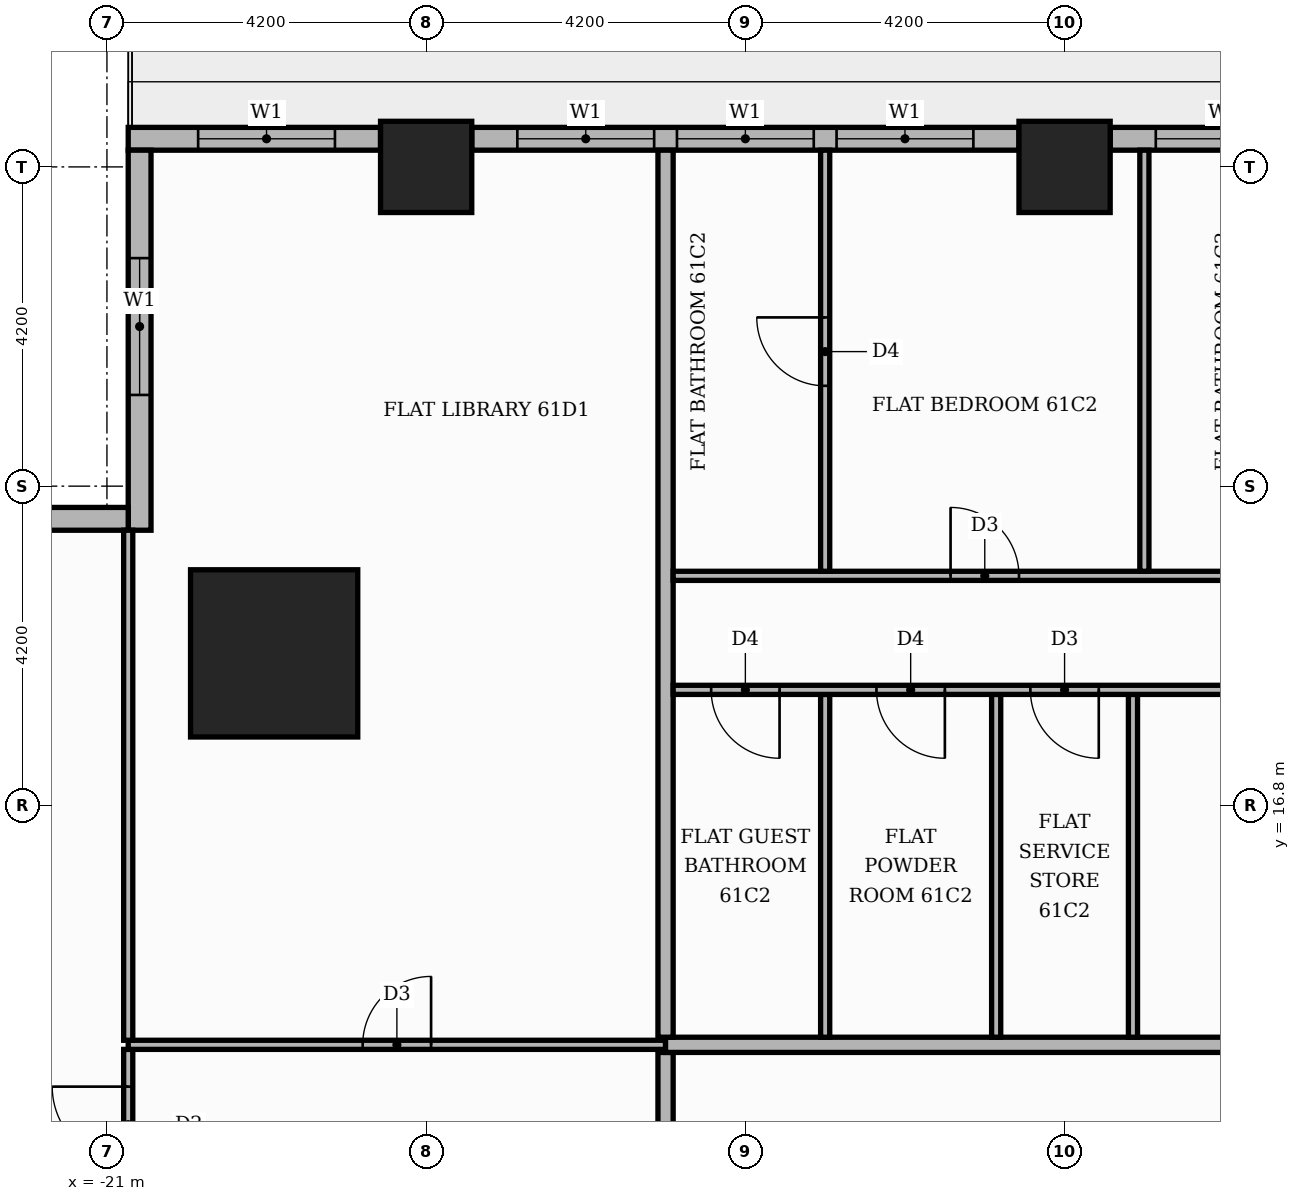
"""IFC4 building model, lengths in metres.
Left out: names, types, materials, properties, quantities, classifications, styles, units other than length and angle.
Written with IfcOpenShell. Run it as: python <this file> out.ifc"""

import sys

from ifc_helpers import new_model, si_unit, direction, frame, frame_2d, origin, origin_2d, place, context, subcontext, project, spatial, rectangle, extrude, element, fill, save


model = new_model("IFC4")
c1 = context("Model", 3, precision=1e-05, world=origin(), true_north=direction((0.0, 1.0)))
c2 = subcontext(c1, "Body", "Model", "MODEL_VIEW")
j1 = project(units=[si_unit("LENGTHUNIT", "METRE"), si_unit("PLANEANGLEUNIT", "RADIAN")], contexts=[c1])
p1 = place(None, origin())
s1 = spatial("IfcSite", under=j1, at=p1, CompositionType="ELEMENT")
p2 = place(p1, origin())
s2 = spatial("IfcBuilding", under=s1, at=p2, CompositionType="ELEMENT")
p3 = place(p2, frame((0.0, 0.0, 256.2)))
s3 = spatial("IfcBuildingStorey", under=s2, at=p3, CompositionType="ELEMENT", Elevation=256.2)
p4 = place(p3, frame((-18.8, 18.8, 0.0), z_axis=(0.0, 0.0, 1.0), x_axis=(1.0, 0.0, 0.0)))
e1 = element("IfcColumn", 1, at=p4, inside=s3, PredefinedType="COLUMN", context=c2, shape_type="SweptSolid", body=[
    extrude(rectangle(XDim=2.2, YDim=2.2, at=origin_2d()), origin(), (0.0, 0.0, 1.0), 3.9),
])
for number, where, z_axis, x_axis in (
    (2, (-8.4, 25.2, 0.0), (0.0, 0.0, 1.0), (1.0, 0.0, 0.0)),
    (3, (-16.8, 25.2, 0.0), (0.0, 0.0, 1.0), (1.0, 0.0, 0.0)),
):
    element("IfcColumn", number, at=place(p3, frame(where, z_axis=z_axis, x_axis=x_axis)), inside=s3, PredefinedType="COLUMN", context=c2, shape_type="SweptSolid", body=[
        extrude(rectangle(XDim=1.2, YDim=1.2, at=origin_2d()), origin(), (0.0, 0.0, 1.0), 3.9),
    ])
p5 = place(p3, frame((-0.6, 25.57, 0.0), z_axis=(0.0, 0.0, 1.0), x_axis=(-1.0, 0.0, 0.0)))
e4 = element("IfcWall", 4, at=p5, inside=s3, PredefinedType="STANDARD", context=c2, shape_type="SweptSolid", body=[
    extrude(rectangle(XDim=7.2, YDim=0.3, at=frame_2d((3.6, 0.0))), origin(), (0.0, 0.0, 1.0), 3.48),
])
p6 = place(p5, frame((0.6, 0.0, 0.0)))
e5 = element("IfcOpeningElement", 5, at=p6, cuts=e4, PredefinedType="OPENING", context=c2, shape_type="SweptSolid", body=[
    extrude(rectangle(XDim=1.8, YDim=2.4, at=frame_2d((0.9, 1.2))), frame((0.0, 0.16, 0.0), z_axis=(0.0, -1.0, 0.0), x_axis=(1.0, 0.0, 0.0)), (0.0, 0.0, 1.0), 0.32),
])
p7 = place(p5, frame((2.7, 0.0, 0.9)))
e6 = element("IfcOpeningElement", 6, at=p7, cuts=e4, PredefinedType="OPENING", context=c2, shape_type="SweptSolid", body=[
    extrude(rectangle(XDim=1.8, YDim=2.1, at=frame_2d((0.9, 1.05))), frame((0.0, 0.16, 0.0), z_axis=(0.0, -1.0, 0.0), x_axis=(1.0, 0.0, 0.0)), (0.0, 0.0, 1.0), 0.32),
])
p8 = place(p5, frame((4.8, 0.0, 0.9)))
e7 = element("IfcOpeningElement", 7, at=p8, cuts=e4, PredefinedType="OPENING", context=c2, shape_type="SweptSolid", body=[
    extrude(rectangle(XDim=1.8, YDim=2.1, at=frame_2d((0.9, 1.05))), frame((0.0, 0.16, 0.0), z_axis=(0.0, -1.0, 0.0), x_axis=(1.0, 0.0, 0.0)), (0.0, 0.0, 1.0), 0.32),
])
p9 = place(p3, frame((-9.0, 25.57, 0.0), z_axis=(0.0, 0.0, 1.0), x_axis=(-1.0, 0.0, 0.0)))
e8 = element("IfcWall", 8, at=p9, inside=s3, PredefinedType="STANDARD", context=c2, shape_type="SweptSolid", body=[
    extrude(rectangle(XDim=7.2, YDim=0.3, at=frame_2d((3.6, 0.0))), origin(), (0.0, 0.0, 1.0), 3.48),
])
p10 = place(p9, frame((0.6, 0.0, 0.9)))
e9 = element("IfcOpeningElement", 9, at=p10, cuts=e8, PredefinedType="OPENING", context=c2, shape_type="SweptSolid", body=[
    extrude(rectangle(XDim=1.8, YDim=2.1, at=frame_2d((0.9, 1.05))), frame((0.0, 0.16, 0.0), z_axis=(0.0, -1.0, 0.0), x_axis=(1.0, 0.0, 0.0)), (0.0, 0.0, 1.0), 0.32),
])
p11 = place(p9, frame((2.7, 0.0, 0.9)))
e10 = element("IfcOpeningElement", 10, at=p11, cuts=e8, PredefinedType="OPENING", context=c2, shape_type="SweptSolid", body=[
    extrude(rectangle(XDim=1.8, YDim=2.1, at=frame_2d((0.9, 1.05))), frame((0.0, 0.16, 0.0), z_axis=(0.0, -1.0, 0.0), x_axis=(1.0, 0.0, 0.0)), (0.0, 0.0, 1.0), 0.32),
])
p12 = place(p9, frame((4.8, 0.0, 0.9)))
e11 = element("IfcOpeningElement", 11, at=p12, cuts=e8, PredefinedType="OPENING", context=c2, shape_type="SweptSolid", body=[
    extrude(rectangle(XDim=1.8, YDim=2.1, at=frame_2d((0.9, 1.05))), frame((0.0, 0.16, 0.0), z_axis=(0.0, -1.0, 0.0), x_axis=(1.0, 0.0, 0.0)), (0.0, 0.0, 1.0), 0.32),
])
p13 = place(p3, frame((-17.4, 25.57, 0.0), z_axis=(0.0, 0.0, 1.0), x_axis=(-1.0, 0.0, 0.0)))
e12 = element("IfcWall", 12, at=p13, inside=s3, PredefinedType="STANDARD", context=c2, shape_type="SweptSolid", body=[
    extrude(rectangle(XDim=3.32, YDim=0.3, at=frame_2d((1.66, 0.0))), origin(), (0.0, 0.0, 1.0), 3.48),
])
p14 = place(p13, frame((0.6, 0.0, 0.9)))
e13 = element("IfcOpeningElement", 13, at=p14, cuts=e12, PredefinedType="OPENING", context=c2, shape_type="SweptSolid", body=[
    extrude(rectangle(XDim=1.8, YDim=2.1, at=frame_2d((0.9, 1.05))), frame((0.0, 0.16, 0.0), z_axis=(0.0, -1.0, 0.0), x_axis=(1.0, 0.0, 0.0)), (0.0, 0.0, 1.0), 0.32),
])
p15 = place(p3, frame((-20.57, 25.42, 0.0), z_axis=(0.0, 0.0, 1.0), x_axis=(0.0, -1.0, 0.0)))
e14 = element("IfcWall", 14, at=p15, inside=s3, PredefinedType="STANDARD", context=c2, shape_type="SweptSolid", body=[
    extrude(rectangle(XDim=5.0, YDim=0.3, at=frame_2d((2.5, 0.0))), origin(), (0.0, 0.0, 1.0), 3.48),
])
p16 = place(p15, frame((1.42, 0.0, 0.9)))
e15 = element("IfcOpeningElement", 15, at=p16, cuts=e14, PredefinedType="OPENING", context=c2, shape_type="SweptSolid", body=[
    extrude(rectangle(XDim=1.8, YDim=2.1, at=frame_2d((0.9, 1.05))), frame((0.0, 0.16, 0.0), z_axis=(0.0, -1.0, 0.0), x_axis=(1.0, 0.0, 0.0)), (0.0, 0.0, 1.0), 0.32),
])
p17 = place(p3, frame((-20.72, 20.57, 0.0), z_axis=(0.0, 0.0, 1.0), x_axis=(-1.0, 0.0, 0.0)))
e16 = element("IfcWall", 16, at=p17, inside=s3, PredefinedType="STANDARD", context=c2, shape_type="SweptSolid", body=[
    extrude(rectangle(XDim=5.0, YDim=0.3, at=frame_2d((2.5, 0.0))), origin(), (0.0, 0.0, 1.0), 3.48),
])
p18 = place(p17, frame((1.48, 0.0, 0.9)))
e17 = element("IfcOpeningElement", 17, at=p18, cuts=e16, PredefinedType="OPENING", context=c2, shape_type="SweptSolid", body=[
    extrude(rectangle(XDim=1.8, YDim=2.1, at=frame_2d((0.9, 1.05))), frame((0.0, 0.16, 0.0), z_axis=(0.0, -1.0, 0.0), x_axis=(1.0, 0.0, 0.0)), (0.0, 0.0, 1.0), 0.32),
])
p19 = place(p3, frame((-13.65, 11.1, 0.0), z_axis=(0.0, 0.0, 1.0), x_axis=(0.0, 1.0, 0.0)))
e18 = element("IfcWall", 18, at=p19, inside=s3, PredefinedType="PARTITIONING", context=c2, shape_type="SweptSolid", body=[
    extrude(rectangle(XDim=2.45, YDim=0.2, at=frame_2d((1.225, 0.0))), origin(), (0.0, 0.0, 1.0), 3.48),
])
p20 = place(p3, frame((-20.72, 11.61, 0.0), z_axis=(0.0, 0.0, 1.0), x_axis=(0.0, 1.0, 0.0)))
e19 = element("IfcWall", 19, at=p20, inside=s3, PredefinedType="PARTITIONING", context=c2, shape_type="SweptSolid", body=[
    extrude(rectangle(XDim=1.98, YDim=0.12, at=frame_2d((0.99, 0.0))), origin(), (0.0, 0.0, 1.0), 3.48),
])
p21 = place(p20, frame((0.49, 0.0, 0.0)))
e20 = element("IfcOpeningElement", 20, at=p21, cuts=e19, PredefinedType="OPENING", context=c2, shape_type="SweptSolid", body=[
    extrude(rectangle(XDim=1.0, YDim=2.1, at=frame_2d((0.5, 1.05))), frame((0.0, 0.07, 0.0), z_axis=(0.0, -1.0, 0.0), x_axis=(1.0, 0.0, 0.0)), (0.0, 0.0, 1.0), 0.14),
])
p22 = place(p3, frame((-20.72, 13.65, 0.0), z_axis=(0.0, 0.0, 1.0), x_axis=(1.0, 0.0, 0.0)))
e21 = element("IfcWall", 21, at=p22, inside=s3, PredefinedType="PARTITIONING", context=c2, shape_type="SweptSolid", body=[
    extrude(rectangle(XDim=7.07, YDim=0.12, at=frame_2d((3.535, 0.0))), origin(), (0.0, 0.0, 1.0), 3.48),
])
p23 = place(p22, frame((3.085, 0.0, 0.0)))
e22 = element("IfcOpeningElement", 22, at=p23, cuts=e21, PredefinedType="OPENING", context=c2, shape_type="SweptSolid", body=[
    extrude(rectangle(XDim=0.9, YDim=2.1, at=frame_2d((0.45, 1.05))), frame((0.0, 0.07, 0.0), z_axis=(0.0, -1.0, 0.0), x_axis=(1.0, 0.0, 0.0)), (0.0, 0.0, 1.0), 0.14),
])
p24 = place(p3, frame((-13.65, 13.65, 0.0), z_axis=(0.0, 0.0, 1.0), x_axis=(1.0, 0.0, 0.0)))
e23 = element("IfcWall", 23, at=p24, inside=s3, PredefinedType="PARTITIONING", context=c2, shape_type="SweptSolid", body=[
    extrude(rectangle(XDim=39.07, YDim=0.2, at=frame_2d((19.535, 0.0))), origin(), (0.0, 0.0, 1.0), 3.48),
])
p25 = place(p24, frame((24.65, 0.0, 0.0)))
e24 = element("IfcOpeningElement", 24, at=p25, cuts=e23, PredefinedType="OPENING", context=c2, shape_type="SweptSolid", body=[
    extrude(rectangle(XDim=1.1, YDim=2.4, at=frame_2d((0.55, 1.2))), frame((0.0, 0.11, 0.0), z_axis=(0.0, -1.0, 0.0), x_axis=(1.0, 0.0, 0.0)), (0.0, 0.0, 1.0), 0.22),
])
p26 = place(p24, frame((14.15, 0.0, 0.0)))
e25 = element("IfcOpeningElement", 25, at=p26, cuts=e23, PredefinedType="OPENING", context=c2, shape_type="SweptSolid", body=[
    extrude(rectangle(XDim=1.1, YDim=2.4, at=frame_2d((0.55, 1.2))), frame((0.0, 0.11, 0.0), z_axis=(0.0, -1.0, 0.0), x_axis=(1.0, 0.0, 0.0)), (0.0, 0.0, 1.0), 0.22),
])
p27 = place(p3, frame((-20.72, 13.71, 0.0), z_axis=(0.0, 0.0, 1.0), x_axis=(0.0, 1.0, 0.0)))
e26 = element("IfcWall", 26, at=p27, inside=s3, PredefinedType="PARTITIONING", context=c2, shape_type="SweptSolid", body=[
    extrude(rectangle(XDim=6.71, YDim=0.12, at=frame_2d((3.355, 0.0))), origin(), (0.0, 0.0, 1.0), 3.48),
])
p28 = place(p3, frame((-13.65, 13.75, 0.0), z_axis=(0.0, 0.0, 1.0), x_axis=(0.0, 1.0, 0.0)))
e27 = element("IfcWall", 27, at=p28, inside=s3, PredefinedType="PARTITIONING", context=c2, shape_type="SweptSolid", body=[
    extrude(rectangle(XDim=11.67, YDim=0.2, at=frame_2d((5.835, 0.0))), origin(), (0.0, 0.0, 1.0), 3.48),
])
for number, where, z_axis, x_axis in (
    (28, (-11.55, 13.75, 0.0), (0.0, 0.0, 1.0), (0.0, 1.0, 0.0)),
    (29, (-9.3, 13.75, 0.0), (0.0, 0.0, 1.0), (0.0, 1.0, 0.0)),
    (30, (-7.5, 13.75, 0.0), (0.0, 0.0, 1.0), (0.0, 1.0, 0.0)),
):
    element("IfcWall", number, at=place(p3, frame(where, z_axis=z_axis, x_axis=x_axis)), inside=s3, PredefinedType="PARTITIONING", context=c2, shape_type="SweptSolid", body=[
        extrude(rectangle(XDim=4.51, YDim=0.12, at=frame_2d((2.255, 0.0))), origin(), (0.0, 0.0, 1.0), 3.48),
    ])
p29 = place(p3, frame((-13.55, 18.32, 0.0), z_axis=(0.0, 0.0, 1.0), x_axis=(1.0, 0.0, 0.0)))
e31 = element("IfcWall", 31, at=p29, inside=s3, PredefinedType="PARTITIONING", context=c2, shape_type="SweptSolid", body=[
    extrude(rectangle(XDim=12.5, YDim=0.12, at=frame_2d((6.25, 0.0))), origin(), (0.0, 0.0, 1.0), 3.48),
])
p30 = place(p29, frame((8.825, 0.0, 0.0)))
e32 = element("IfcOpeningElement", 32, at=p30, cuts=e31, PredefinedType="OPENING", context=c2, shape_type="SweptSolid", body=[
    extrude(rectangle(XDim=0.9, YDim=2.1, at=frame_2d((0.45, 1.05))), frame((0.0, 0.07, 0.0), z_axis=(0.0, -1.0, 0.0), x_axis=(1.0, 0.0, 0.0)), (0.0, 0.0, 1.0), 0.14),
])
p31 = place(p29, frame((4.7, 0.0, 0.0)))
e33 = element("IfcOpeningElement", 33, at=p31, cuts=e31, PredefinedType="OPENING", context=c2, shape_type="SweptSolid", body=[
    extrude(rectangle(XDim=0.9, YDim=2.1, at=frame_2d((0.45, 1.05))), frame((0.0, 0.07, 0.0), z_axis=(0.0, -1.0, 0.0), x_axis=(1.0, 0.0, 0.0)), (0.0, 0.0, 1.0), 0.14),
])
p32 = place(p29, frame((2.675, 0.0, 0.0)))
e34 = element("IfcOpeningElement", 34, at=p32, cuts=e31, PredefinedType="OPENING", context=c2, shape_type="SweptSolid", body=[
    extrude(rectangle(XDim=0.9, YDim=2.1, at=frame_2d((0.45, 1.05))), frame((0.0, 0.07, 0.0), z_axis=(0.0, -1.0, 0.0), x_axis=(1.0, 0.0, 0.0)), (0.0, 0.0, 1.0), 0.14),
])
p33 = place(p29, frame((0.5, 0.0, 0.0)))
e35 = element("IfcOpeningElement", 35, at=p33, cuts=e31, PredefinedType="OPENING", context=c2, shape_type="SweptSolid", body=[
    extrude(rectangle(XDim=0.9, YDim=2.1, at=frame_2d((0.45, 1.05))), frame((0.0, 0.07, 0.0), z_axis=(0.0, -1.0, 0.0), x_axis=(1.0, 0.0, 0.0)), (0.0, 0.0, 1.0), 0.14),
])
p34 = place(p3, frame((-13.55, 19.82, 0.0), z_axis=(0.0, 0.0, 1.0), x_axis=(1.0, 0.0, 0.0)))
e36 = element("IfcWall", 36, at=p34, inside=s3, PredefinedType="PARTITIONING", context=c2, shape_type="SweptSolid", body=[
    extrude(rectangle(XDim=18.7, YDim=0.12, at=frame_2d((9.35, 0.0))), origin(), (0.0, 0.0, 1.0), 3.48),
])
p35 = place(p34, frame((16.2, 0.0, 0.0)))
e37 = element("IfcOpeningElement", 37, at=p35, cuts=e36, PredefinedType="OPENING", context=c2, shape_type="SweptSolid", body=[
    extrude(rectangle(XDim=1.0, YDim=2.1, at=frame_2d((0.5, 1.05))), frame((0.0, 0.07, 0.0), z_axis=(0.0, -1.0, 0.0), x_axis=(1.0, 0.0, 0.0)), (0.0, 0.0, 1.0), 0.14),
])
p36 = place(p34, frame((12.05, 0.0, 0.0)))
e38 = element("IfcOpeningElement", 38, at=p36, cuts=e36, PredefinedType="OPENING", context=c2, shape_type="SweptSolid", body=[
    extrude(rectangle(XDim=0.9, YDim=2.1, at=frame_2d((0.45, 1.05))), frame((0.0, 0.07, 0.0), z_axis=(0.0, -1.0, 0.0), x_axis=(1.0, 0.0, 0.0)), (0.0, 0.0, 1.0), 0.14),
])
p37 = place(p34, frame((3.65, 0.0, 0.0)))
e39 = element("IfcOpeningElement", 39, at=p37, cuts=e36, PredefinedType="OPENING", context=c2, shape_type="SweptSolid", body=[
    extrude(rectangle(XDim=0.9, YDim=2.1, at=frame_2d((0.45, 1.05))), frame((0.0, 0.07, 0.0), z_axis=(0.0, -1.0, 0.0), x_axis=(1.0, 0.0, 0.0)), (0.0, 0.0, 1.0), 0.14),
])
p38 = place(p3, frame((-11.55, 19.88, 0.0), z_axis=(0.0, 0.0, 1.0), x_axis=(0.0, 1.0, 0.0)))
e40 = element("IfcWall", 40, at=p38, inside=s3, PredefinedType="PARTITIONING", context=c2, shape_type="SweptSolid", body=[
    extrude(rectangle(XDim=5.54, YDim=0.12, at=frame_2d((2.77, 0.0))), origin(), (0.0, 0.0, 1.0), 3.48),
])
p39 = place(p38, frame((2.44, 0.0, 0.0)))
e41 = element("IfcOpeningElement", 41, at=p39, cuts=e40, PredefinedType="OPENING", context=c2, shape_type="SweptSolid", body=[
    extrude(rectangle(XDim=0.9, YDim=2.1, at=frame_2d((0.45, 1.05))), frame((0.0, 0.07, 0.0), z_axis=(0.0, -1.0, 0.0), x_axis=(1.0, 0.0, 0.0)), (0.0, 0.0, 1.0), 0.14),
])
p40 = place(p3, frame((-7.35, 19.88, 0.0), z_axis=(0.0, 0.0, 1.0), x_axis=(0.0, 1.0, 0.0)))
e42 = element("IfcWall", 42, at=p40, inside=s3, PredefinedType="PARTITIONING", context=c2, shape_type="SweptSolid", body=[
    extrude(rectangle(XDim=5.54, YDim=0.12, at=frame_2d((2.77, 0.0))), origin(), (0.0, 0.0, 1.0), 3.48),
])
p41 = place(p8, origin())
e43 = element("IfcWindow", 43, at=p41, inside=s3, PartitioningType="SINGLE_PANEL", PredefinedType="WINDOW", context=c2, shape_type="SweptSolid", body=[
    extrude(rectangle(XDim=1.8, YDim=2.1, at=frame_2d((0.9, 1.05))), frame((0.0, 0.03, 0.0), z_axis=(0.0, -1.0, 0.0), x_axis=(1.0, 0.0, 0.0)), (0.0, 0.0, 1.0), 0.06),
])
fill(e7, e43)
p42 = place(p10, origin())
e44 = element("IfcWindow", 44, at=p42, inside=s3, PartitioningType="SINGLE_PANEL", PredefinedType="WINDOW", context=c2, shape_type="SweptSolid", body=[
    extrude(rectangle(XDim=1.8, YDim=2.1, at=frame_2d((0.9, 1.05))), frame((0.0, 0.03, 0.0), z_axis=(0.0, -1.0, 0.0), x_axis=(1.0, 0.0, 0.0)), (0.0, 0.0, 1.0), 0.06),
])
fill(e9, e44)
p43 = place(p11, origin())
e45 = element("IfcWindow", 45, at=p43, inside=s3, PartitioningType="SINGLE_PANEL", PredefinedType="WINDOW", context=c2, shape_type="SweptSolid", body=[
    extrude(rectangle(XDim=1.8, YDim=2.1, at=frame_2d((0.9, 1.05))), frame((0.0, 0.03, 0.0), z_axis=(0.0, -1.0, 0.0), x_axis=(1.0, 0.0, 0.0)), (0.0, 0.0, 1.0), 0.06),
])
fill(e10, e45)
p44 = place(p12, origin())
e46 = element("IfcWindow", 46, at=p44, inside=s3, PartitioningType="SINGLE_PANEL", PredefinedType="WINDOW", context=c2, shape_type="SweptSolid", body=[
    extrude(rectangle(XDim=1.8, YDim=2.1, at=frame_2d((0.9, 1.05))), frame((0.0, 0.03, 0.0), z_axis=(0.0, -1.0, 0.0), x_axis=(1.0, 0.0, 0.0)), (0.0, 0.0, 1.0), 0.06),
])
fill(e11, e46)
p45 = place(p14, origin())
e47 = element("IfcWindow", 47, at=p45, inside=s3, PartitioningType="SINGLE_PANEL", PredefinedType="WINDOW", context=c2, shape_type="SweptSolid", body=[
    extrude(rectangle(XDim=1.8, YDim=2.1, at=frame_2d((0.9, 1.05))), frame((0.0, 0.03, 0.0), z_axis=(0.0, -1.0, 0.0), x_axis=(1.0, 0.0, 0.0)), (0.0, 0.0, 1.0), 0.06),
])
fill(e13, e47)
p46 = place(p16, origin())
e48 = element("IfcWindow", 48, at=p46, inside=s3, PartitioningType="SINGLE_PANEL", PredefinedType="WINDOW", context=c2, shape_type="SweptSolid", body=[
    extrude(rectangle(XDim=1.8, YDim=2.1, at=frame_2d((0.9, 1.05))), frame((0.0, 0.03, 0.0), z_axis=(0.0, -1.0, 0.0), x_axis=(1.0, 0.0, 0.0)), (0.0, 0.0, 1.0), 0.06),
])
fill(e15, e48)
p47 = place(p31, frame((0.9, 0.0, 0.0), z_axis=(0.0, 0.0, 1.0), x_axis=(-1.0, 0.0, 0.0)))
e49 = element("IfcDoor", 49, at=p47, inside=s3, OperationType="SINGLE_SWING_RIGHT", PredefinedType="DOOR", context=c2, shape_type="SweptSolid", body=[
    extrude(rectangle(XDim=0.9, YDim=2.1, at=frame_2d((0.45, 1.05))), frame((0.0, 0.025, 0.0), z_axis=(0.0, -1.0, 0.0), x_axis=(1.0, 0.0, 0.0)), (0.0, 0.0, 1.0), 0.05),
])
fill(e33, e49)
p48 = place(p32, frame((0.9, 0.0, 0.0), z_axis=(0.0, 0.0, 1.0), x_axis=(-1.0, 0.0, 0.0)))
e50 = element("IfcDoor", 50, at=p48, inside=s3, OperationType="SINGLE_SWING_RIGHT", PredefinedType="DOOR", context=c2, shape_type="SweptSolid", body=[
    extrude(rectangle(XDim=0.9, YDim=2.1, at=frame_2d((0.45, 1.05))), frame((0.0, 0.025, 0.0), z_axis=(0.0, -1.0, 0.0), x_axis=(1.0, 0.0, 0.0)), (0.0, 0.0, 1.0), 0.05),
])
fill(e34, e50)
p49 = place(p33, frame((0.9, 0.0, 0.0), z_axis=(0.0, 0.0, 1.0), x_axis=(-1.0, 0.0, 0.0)))
e51 = element("IfcDoor", 51, at=p49, inside=s3, OperationType="SINGLE_SWING_RIGHT", PredefinedType="DOOR", context=c2, shape_type="SweptSolid", body=[
    extrude(rectangle(XDim=0.9, YDim=2.1, at=frame_2d((0.45, 1.05))), frame((0.0, 0.025, 0.0), z_axis=(0.0, -1.0, 0.0), x_axis=(1.0, 0.0, 0.0)), (0.0, 0.0, 1.0), 0.05),
])
fill(e35, e51)
p50 = place(p37, origin())
e52 = element("IfcDoor", 52, at=p50, inside=s3, OperationType="SINGLE_SWING_LEFT", PredefinedType="DOOR", context=c2, shape_type="SweptSolid", body=[
    extrude(rectangle(XDim=0.9, YDim=2.1, at=frame_2d((0.45, 1.05))), frame((0.0, 0.025, 0.0), z_axis=(0.0, -1.0, 0.0), x_axis=(1.0, 0.0, 0.0)), (0.0, 0.0, 1.0), 0.05),
])
fill(e39, e52)
p51 = place(p39, origin())
e53 = element("IfcDoor", 53, at=p51, inside=s3, OperationType="SINGLE_SWING_RIGHT", PredefinedType="DOOR", context=c2, shape_type="SweptSolid", body=[
    extrude(rectangle(XDim=0.9, YDim=2.1, at=frame_2d((0.45, 1.05))), frame((0.0, 0.025, 0.0), z_axis=(0.0, -1.0, 0.0), x_axis=(1.0, 0.0, 0.0)), (0.0, 0.0, 1.0), 0.05),
])
fill(e41, e53)
p52 = place(p23, origin())
e54 = element("IfcDoor", 54, at=p52, inside=s3, OperationType="SINGLE_SWING_RIGHT", PredefinedType="DOOR", context=c2, shape_type="SweptSolid", body=[
    extrude(rectangle(XDim=0.9, YDim=2.1, at=frame_2d((0.45, 1.05))), frame((0.0, 0.025, 0.0), z_axis=(0.0, -1.0, 0.0), x_axis=(1.0, 0.0, 0.0)), (0.0, 0.0, 1.0), 0.05),
])
fill(e22, e54)
p53 = place(p21, origin())
e55 = element("IfcDoor", 55, at=p53, inside=s3, OperationType="SINGLE_SWING_RIGHT", PredefinedType="DOOR", context=c2, shape_type="SweptSolid", body=[
    extrude(rectangle(XDim=1.0, YDim=2.1, at=frame_2d((0.5, 1.05))), frame((0.0, 0.025, 0.0), z_axis=(0.0, -1.0, 0.0), x_axis=(1.0, 0.0, 0.0)), (0.0, 0.0, 1.0), 0.05),
])
fill(e20, e55)
save(model, sys.argv[1])
